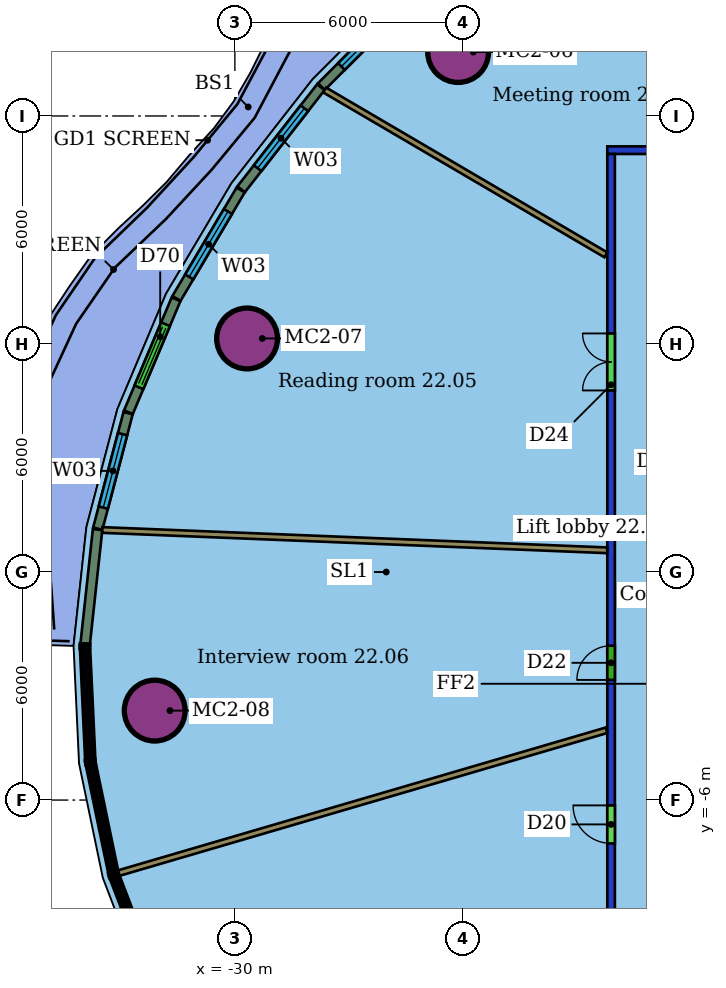
"""IFC4 building model, lengths in metres.
Left out: names, types, materials, properties, quantities, classifications, styles, units other than length and angle.
Written with IfcOpenShell. Run it as: python <this file> out.ifc"""

import sys

from ifc_helpers import new_model, si_unit, direction, frame, frame_2d, origin, origin_2d, place, context, subcontext, project, spatial, rectangle, hollow_circle, extrude, element, fill, save


model = new_model("IFC4")
c1 = context("Model", 3, precision=1e-05, world=origin(), true_north=direction((0.0, 1.0)))
c2 = subcontext(c1, "Body", "Model", "MODEL_VIEW")
j1 = project(units=[si_unit("LENGTHUNIT", "METRE"), si_unit("PLANEANGLEUNIT", "RADIAN")], contexts=[c1])
p1 = place(None, origin())
s1 = spatial("IfcSite", under=j1, at=p1, CompositionType="ELEMENT")
p2 = place(p1, origin())
s2 = spatial("IfcBuilding", under=s1, at=p2, CompositionType="ELEMENT")
p3 = place(p2, frame((0.0, 0.0, 99.4)))
s3 = spatial("IfcBuildingStorey", under=s2, at=p3, CompositionType="ELEMENT", Elevation=99.4)
for number, where, z_axis, x_axis in (
    (1, (-24.125, 13.683, 0.0), (0.0, 0.0, 1.0), (1.0, 0.0, 0.0)),
    (2, (-29.679, 6.146, 0.0), (0.0, 0.0, 1.0), (1.0, 0.0, 0.0)),
    (3, (-32.109, -3.646, 0.0), (0.0, 0.0, 1.0), (1.0, 0.0, 0.0)),
):
    element("IfcColumn", number, at=place(p3, frame(where, z_axis=z_axis, x_axis=x_axis)), inside=s3, PredefinedType="COLUMN", context=c2, shape_type="SweptSolid", body=[
        extrude(hollow_circle(Radius=0.8, WallThickness=0.055, at=origin_2d()), origin(), (0.0, 0.0, 1.0), 3.45),
    ])
p4 = place(p3, frame((-20.1, -11.0, 0.0), z_axis=(0.0, 0.0, 1.0), x_axis=(0.0, 1.0, 0.0)))
e4 = element("IfcWall", 4, at=p4, inside=s3, PredefinedType="PARTITIONING", context=c2, shape_type="SweptSolid", body=[
    extrude(rectangle(XDim=22.0, YDim=0.2, at=frame_2d((11.0, 0.0))), origin(), (0.0, 0.0, 1.0), 3.0),
])
p5 = place(p4, frame((15.778, 0.0, 0.0)))
e5 = element("IfcOpeningElement", 5, at=p5, cuts=e4, PredefinedType="OPENING", context=c2, shape_type="SweptSolid", body=[
    extrude(rectangle(XDim=1.5, YDim=2.1, at=frame_2d((0.75, 1.05))), frame((0.0, 0.11, 0.0), z_axis=(0.0, -1.0, 0.0), x_axis=(1.0, 0.0, 0.0)), (0.0, 0.0, 1.0), 0.22),
])
p6 = place(p4, frame((8.161, 0.0, 0.0)))
e6 = element("IfcOpeningElement", 6, at=p6, cuts=e4, PredefinedType="OPENING", context=c2, shape_type="SweptSolid", body=[
    extrude(rectangle(XDim=0.9, YDim=2.1, at=frame_2d((0.45, 1.05))), frame((0.0, 0.11, 0.0), z_axis=(0.0, -1.0, 0.0), x_axis=(1.0, 0.0, 0.0)), (0.0, 0.0, 1.0), 0.22),
])
p7 = place(p4, frame((3.86, 0.0, 0.0)))
e7 = element("IfcOpeningElement", 7, at=p7, cuts=e4, PredefinedType="OPENING", context=c2, shape_type="SweptSolid", body=[
    extrude(rectangle(XDim=1.0, YDim=2.1, at=frame_2d((0.5, 1.05))), frame((0.0, 0.11, 0.0), z_axis=(0.0, -1.0, 0.0), x_axis=(1.0, 0.0, 0.0)), (0.0, 0.0, 1.0), 0.22),
])
p8 = place(p3, frame((-20.2, 11.1, 0.0), z_axis=(0.0, 0.0, 1.0), x_axis=(1.0, 0.0, 0.0)))
e8 = element("IfcWall", 8, at=p8, inside=s3, PredefinedType="PARTITIONING", context=c2, shape_type="SweptSolid", body=[
    extrude(rectangle(XDim=28.4, YDim=0.2, at=frame_2d((14.2, 0.0))), origin(), (0.0, 0.0, 1.0), 3.0),
])
p9 = place(p8, frame((22.072, 0.0, 0.0)))
e9 = element("IfcOpeningElement", 9, at=p9, cuts=e8, PredefinedType="OPENING", context=c2, shape_type="SweptSolid", body=[
    extrude(rectangle(XDim=1.8, YDim=2.1, at=frame_2d((0.9, 1.05))), frame((0.0, 0.11, 0.0), z_axis=(0.0, -1.0, 0.0), x_axis=(1.0, 0.0, 0.0)), (0.0, 0.0, 1.0), 0.22),
])
p10 = place(p8, frame((16.343, 0.0, 0.0)))
e10 = element("IfcOpeningElement", 10, at=p10, cuts=e8, PredefinedType="OPENING", context=c2, shape_type="SweptSolid", body=[
    extrude(rectangle(XDim=1.0, YDim=2.1, at=frame_2d((0.5, 1.05))), frame((0.0, 0.11, 0.0), z_axis=(0.0, -1.0, 0.0), x_axis=(1.0, 0.0, 0.0)), (0.0, 0.0, 1.0), 0.22),
])
p11 = place(p8, frame((7.687, 0.0, 0.0)))
e11 = element("IfcOpeningElement", 11, at=p11, cuts=e8, PredefinedType="OPENING", context=c2, shape_type="SweptSolid", body=[
    extrude(rectangle(XDim=1.0, YDim=2.4, at=frame_2d((0.5, 1.2))), frame((0.0, 0.11, 0.0), z_axis=(0.0, -1.0, 0.0), x_axis=(1.0, 0.0, 0.0)), (0.0, 0.0, 1.0), 0.22),
])
p12 = place(p8, frame((3.746, 0.0, 0.0)))
e12 = element("IfcOpeningElement", 12, at=p12, cuts=e8, PredefinedType="OPENING", context=c2, shape_type="SweptSolid", body=[
    extrude(rectangle(XDim=0.9, YDim=2.1, at=frame_2d((0.45, 1.05))), frame((0.0, 0.11, 0.0), z_axis=(0.0, -1.0, 0.0), x_axis=(1.0, 0.0, 0.0)), (0.0, 0.0, 1.0), 0.22),
])
p13 = place(p3, frame((-19.274, 19.292, 0.0), z_axis=(0.0, 0.0, 1.0), x_axis=(0.566847678424, -0.823822620147, 0.0)))
e13 = element("IfcWall", 13, at=p13, inside=s3, PredefinedType="PARTITIONING", context=c2, shape_type="SweptSolid", body=[
    extrude(rectangle(XDim=9.78, YDim=0.125, at=frame_2d((4.89, 0.0))), origin(), (0.0, 0.0, 1.0), 3.45),
])
p14 = place(p3, frame((-27.637, 12.683, 0.0), z_axis=(0.0, 0.0, 1.0), x_axis=(0.862707391, -0.505703428418, 0.0)))
e14 = element("IfcWall", 14, at=p14, inside=s3, PredefinedType="PARTITIONING", context=c2, shape_type="SweptSolid", body=[
    extrude(rectangle(XDim=8.577, YDim=0.15, at=frame_2d((4.289, 0.0))), origin(), (0.0, 0.0, 1.0), 3.45),
])
p15 = place(p3, frame((-33.489, 1.106, 0.0), z_axis=(0.0, 0.0, 1.0), x_axis=(0.999191161374, -0.040212224919, 0.0)))
e15 = element("IfcWall", 15, at=p15, inside=s3, PredefinedType="PARTITIONING", context=c2, shape_type="SweptSolid", body=[
    extrude(rectangle(XDim=13.296, YDim=0.15, at=frame_2d((6.648, 0.0))), origin(), (0.0, 0.0, 1.0), 3.45),
])
p16 = place(p3, frame((-33.067, -7.925, 0.0), z_axis=(0.0, 0.0, 1.0), x_axis=(0.959703459694, 0.281014713942, 0.0)))
e16 = element("IfcWall", 16, at=p16, inside=s3, PredefinedType="PARTITIONING", context=c2, shape_type="SweptSolid", body=[
    extrude(rectangle(XDim=13.385, YDim=0.15, at=frame_2d((6.693, 0.0))), origin(), (0.0, 0.0, 1.0), 3.45),
])
p17 = place(p3, frame((-25.255, 15.243, 0.0), z_axis=(0.0, 0.0, 1.0), x_axis=(-0.706861980523, -0.70735149713, 0.0)))
e17 = element("IfcWall", 17, at=p17, inside=s3, PredefinedType="SOLIDWALL", context=c2, shape_type="SweptSolid", body=[
    extrude(rectangle(XDim=3.491, YDim=0.25, at=frame_2d((1.746, 0.0))), origin(), (0.0, 0.0, 1.0), 3.05),
])
p18 = place(p17, frame((0.746, 0.0, 0.9)))
e18 = element("IfcOpeningElement", 18, at=p18, cuts=e17, PredefinedType="OPENING", context=c2, shape_type="SweptSolid", body=[
    extrude(rectangle(XDim=2.0, YDim=2.1, at=frame_2d((1.0, 1.05))), frame((0.0, 0.135, 0.0), z_axis=(0.0, -1.0, 0.0), x_axis=(1.0, 0.0, 0.0)), (0.0, 0.0, 1.0), 0.27),
])
p19 = place(p3, frame((-27.738, 12.757, 0.0), z_axis=(0.0, 0.0, 1.0), x_axis=(-0.615358853005, -0.788247094525, 0.0)))
e19 = element("IfcWall", 19, at=p19, inside=s3, PredefinedType="SOLIDWALL", context=c2, shape_type="SweptSolid", body=[
    extrude(rectangle(XDim=3.406, YDim=0.25, at=frame_2d((1.703, 0.0))), origin(), (0.0, 0.0, 1.0), 3.05),
])
p20 = place(p19, frame((0.703, 0.0, 0.9)))
e20 = element("IfcOpeningElement", 20, at=p20, cuts=e19, PredefinedType="OPENING", context=c2, shape_type="SweptSolid", body=[
    extrude(rectangle(XDim=2.0, YDim=2.1, at=frame_2d((1.0, 1.05))), frame((0.0, 0.135, 0.0), z_axis=(0.0, -1.0, 0.0), x_axis=(1.0, 0.0, 0.0)), (0.0, 0.0, 1.0), 0.27),
])
p21 = place(p3, frame((-29.848, 10.052, 0.0), z_axis=(0.0, 0.0, 1.0), x_axis=(-0.509364300132, -0.860550991953, 0.0)))
e21 = element("IfcWall", 21, at=p21, inside=s3, PredefinedType="SOLIDWALL", context=c2, shape_type="SweptSolid", body=[
    extrude(rectangle(XDim=3.315, YDim=0.25, at=frame_2d((1.658, 0.0))), origin(), (0.0, 0.0, 1.0), 3.05),
])
p22 = place(p21, frame((0.658, 0.0, 0.9)))
e22 = element("IfcOpeningElement", 22, at=p22, cuts=e21, PredefinedType="OPENING", context=c2, shape_type="SweptSolid", body=[
    extrude(rectangle(XDim=2.0, YDim=2.1, at=frame_2d((1.0, 1.05))), frame((0.0, 0.135, 0.0), z_axis=(0.0, -1.0, 0.0), x_axis=(1.0, 0.0, 0.0)), (0.0, 0.0, 1.0), 0.27),
])
p23 = place(p3, frame((-31.548, 7.177, 0.0), z_axis=(0.0, 0.0, 1.0), x_axis=(-0.388723599909, -0.921354417623, 0.0)))
e23 = element("IfcWall", 23, at=p23, inside=s3, PredefinedType="SOLIDWALL", context=c2, shape_type="SweptSolid", body=[
    extrude(rectangle(XDim=3.225, YDim=0.25, at=frame_2d((1.613, 0.0))), origin(), (0.0, 0.0, 1.0), 3.05),
])
p24 = place(p23, frame((0.713, 0.0, 0.0)))
e24 = element("IfcOpeningElement", 24, at=p24, cuts=e23, PredefinedType="OPENING", context=c2, shape_type="SweptSolid", body=[
    extrude(rectangle(XDim=1.8, YDim=2.4, at=frame_2d((0.9, 1.2))), frame((0.0, 0.135, 0.0), z_axis=(0.0, -1.0, 0.0), x_axis=(1.0, 0.0, 0.0)), (0.0, 0.0, 1.0), 0.27),
])
p25 = place(p3, frame((-32.81, 4.181, 0.0), z_axis=(0.0, 0.0, 1.0), x_axis=(-0.25414525883, -0.967166059896, 0.0)))
e25 = element("IfcWall", 25, at=p25, inside=s3, PredefinedType="SOLIDWALL", context=c2, shape_type="SweptSolid", body=[
    extrude(rectangle(XDim=3.142, YDim=0.25, at=frame_2d((1.571, 0.0))), origin(), (0.0, 0.0, 1.0), 3.05),
])
p26 = place(p25, frame((0.571, 0.0, 0.9)))
e26 = element("IfcOpeningElement", 26, at=p26, cuts=e25, PredefinedType="OPENING", context=c2, shape_type="SweptSolid", body=[
    extrude(rectangle(XDim=2.0, YDim=2.1, at=frame_2d((1.0, 1.05))), frame((0.0, 0.135, 0.0), z_axis=(0.0, -1.0, 0.0), x_axis=(1.0, 0.0, 0.0)), (0.0, 0.0, 1.0), 0.27),
])
p27 = place(p3, frame((-33.613, 1.116, 0.0), z_axis=(0.0, 0.0, 1.0), x_axis=(-0.107752917702, -0.994177704803, 0.0)))
e27 = element("IfcWall", 27, at=p27, inside=s3, PredefinedType="SOLIDWALL", context=c2, shape_type="SweptSolid", body=[
    extrude(rectangle(XDim=3.031, YDim=0.25, at=frame_2d((1.516, 0.0))), origin(), (0.0, 0.0, 1.0), 3.05),
])
p28 = place(p5, origin())
e28 = element("IfcDoor", 28, at=p28, inside=s3, OperationType="DOUBLE_DOOR_SINGLE_SWING", PredefinedType="DOOR", context=c2, shape_type="SweptSolid", body=[
    extrude(rectangle(XDim=1.5, YDim=2.1, at=frame_2d((0.75, 1.05))), frame((0.0, 0.025, 0.0), z_axis=(0.0, -1.0, 0.0), x_axis=(1.0, 0.0, 0.0)), (0.0, 0.0, 1.0), 0.05),
])
fill(e5, e28)
p29 = place(p6, origin())
e29 = element("IfcDoor", 29, at=p29, inside=s3, OperationType="SINGLE_SWING_LEFT", PredefinedType="DOOR", context=c2, shape_type="SweptSolid", body=[
    extrude(rectangle(XDim=0.9, YDim=2.1, at=frame_2d((0.45, 1.05))), frame((0.0, 0.025, 0.0), z_axis=(0.0, -1.0, 0.0), x_axis=(1.0, 0.0, 0.0)), (0.0, 0.0, 1.0), 0.05),
])
fill(e6, e29)
p30 = place(p7, origin())
e30 = element("IfcDoor", 30, at=p30, inside=s3, OperationType="SINGLE_SWING_RIGHT", PredefinedType="DOOR", context=c2, shape_type="SweptSolid", body=[
    extrude(rectangle(XDim=1.0, YDim=2.1, at=frame_2d((0.5, 1.05))), frame((0.0, 0.025, 0.0), z_axis=(0.0, -1.0, 0.0), x_axis=(1.0, 0.0, 0.0)), (0.0, 0.0, 1.0), 0.05),
])
fill(e7, e30)
p31 = place(p18, origin())
e31 = element("IfcWindow", 31, at=p31, inside=s3, PartitioningType="SINGLE_PANEL", PredefinedType="WINDOW", context=c2, shape_type="SweptSolid", body=[
    extrude(rectangle(XDim=2.0, YDim=2.1, at=frame_2d((1.0, 1.05))), frame((0.0, 0.03, 0.0), z_axis=(0.0, -1.0, 0.0), x_axis=(1.0, 0.0, 0.0)), (0.0, 0.0, 1.0), 0.06),
])
fill(e18, e31)
p32 = place(p20, origin())
e32 = element("IfcWindow", 32, at=p32, inside=s3, PartitioningType="SINGLE_PANEL", PredefinedType="WINDOW", context=c2, shape_type="SweptSolid", body=[
    extrude(rectangle(XDim=2.0, YDim=2.1, at=frame_2d((1.0, 1.05))), frame((0.0, 0.03, 0.0), z_axis=(0.0, -1.0, 0.0), x_axis=(1.0, 0.0, 0.0)), (0.0, 0.0, 1.0), 0.06),
])
fill(e20, e32)
p33 = place(p22, origin())
e33 = element("IfcWindow", 33, at=p33, inside=s3, PartitioningType="SINGLE_PANEL", PredefinedType="WINDOW", context=c2, shape_type="SweptSolid", body=[
    extrude(rectangle(XDim=2.0, YDim=2.1, at=frame_2d((1.0, 1.05))), frame((0.0, 0.03, 0.0), z_axis=(0.0, -1.0, 0.0), x_axis=(1.0, 0.0, 0.0)), (0.0, 0.0, 1.0), 0.06),
])
fill(e22, e33)
p34 = place(p24, origin())
e34 = element("IfcDoor", 34, at=p34, inside=s3, OperationType="DOUBLE_DOOR_SLIDING", PredefinedType="DOOR", context=c2, shape_type="SweptSolid", body=[
    extrude(rectangle(XDim=1.8, YDim=2.4, at=frame_2d((0.9, 1.2))), frame((0.0, 0.025, 0.0), z_axis=(0.0, -1.0, 0.0), x_axis=(1.0, 0.0, 0.0)), (0.0, 0.0, 1.0), 0.05),
])
fill(e24, e34)
p35 = place(p26, origin())
e35 = element("IfcWindow", 35, at=p35, inside=s3, PartitioningType="SINGLE_PANEL", PredefinedType="WINDOW", context=c2, shape_type="SweptSolid", body=[
    extrude(rectangle(XDim=2.0, YDim=2.1, at=frame_2d((1.0, 1.05))), frame((0.0, 0.03, 0.0), z_axis=(0.0, -1.0, 0.0), x_axis=(1.0, 0.0, 0.0)), (0.0, 0.0, 1.0), 0.06),
])
fill(e26, e35)
save(model, sys.argv[1])
